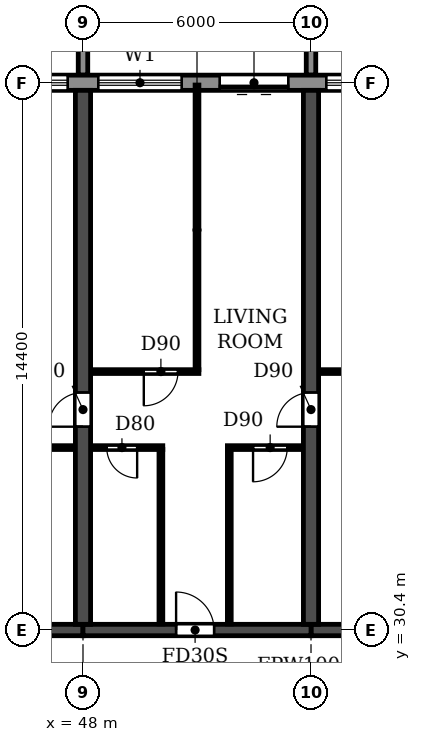
"""IFC4 building model, lengths in metres.
Left out: names, types, materials, properties, quantities, classifications, styles, units other than length and angle.
Written with IfcOpenShell. Run it as: python <this file> out.ifc"""

import sys

from ifc_helpers import new_model, si_unit, direction, frame, frame_2d, origin, place, context, subcontext, project, spatial, polyline, rectangle, outline, extrude, source, transform, mapped, element, fill, save


model = new_model("IFC4")
c1 = context("Model", 3, precision=1e-05, world=origin(), true_north=direction((0.0, 1.0)))
c2 = subcontext(c1, "Body", "Model", "MODEL_VIEW")
j1 = project(units=[si_unit("LENGTHUNIT", "METRE"), si_unit("PLANEANGLEUNIT", "RADIAN")], contexts=[c1])
p1 = place(None, origin())
s1 = spatial("IfcSite", under=j1, at=p1, CompositionType="ELEMENT")
p2 = place(p1, origin())
s2 = spatial("IfcBuilding", under=s1, at=p2, CompositionType="ELEMENT")
p3 = place(p2, frame((0.0, 0.0, 33.3)))
s3 = spatial("IfcBuildingStorey", under=s2, at=p3, CompositionType="ELEMENT", Elevation=33.3)
p4 = place(p3, frame((48.0, 30.55, 0.0), z_axis=(0.0, 0.0, 1.0), x_axis=(0.0, 1.0, 0.0)))
e1 = element("IfcWall", 1, at=p4, inside=s3, PredefinedType="SHEAR", context=c2, shape_type="SweptSolid", body=[
    extrude(rectangle(XDim=14.05, YDim=0.4, at=frame_2d((7.025, 0.0))), origin(), (0.0, 0.0, 1.0), 3.05),
])
p5 = place(p4, frame((5.2, 0.0, 0.0)))
e2 = element("IfcOpeningElement", 2, at=p5, cuts=e1, PredefinedType="OPENING", context=c2, shape_type="SweptSolid", body=[
    extrude(rectangle(XDim=0.9, YDim=2.1, at=frame_2d((0.45, 1.05))), frame((0.0, 0.21, 0.0), z_axis=(0.0, -1.0, 0.0), x_axis=(1.0, 0.0, 0.0)), (0.0, 0.0, 1.0), 0.42),
])
p6 = place(p3, frame((54.0, 30.55, 0.0), z_axis=(0.0, 0.0, 1.0), x_axis=(0.0, 1.0, 0.0)))
e3 = element("IfcWall", 3, at=p6, inside=s3, PredefinedType="SHEAR", context=c2, shape_type="SweptSolid", body=[
    extrude(rectangle(XDim=14.05, YDim=0.4, at=frame_2d((7.025, 0.0))), origin(), (0.0, 0.0, 1.0), 3.05),
])
p7 = place(p6, frame((5.2, 0.0, 0.0)))
e4 = element("IfcOpeningElement", 4, at=p7, cuts=e3, PredefinedType="OPENING", context=c2, shape_type="SweptSolid", body=[
    extrude(rectangle(XDim=0.9, YDim=2.1, at=frame_2d((0.45, 1.05))), frame((0.0, 0.21, 0.0), z_axis=(0.0, -1.0, 0.0), x_axis=(1.0, 0.0, 0.0)), (0.0, 0.0, 1.0), 0.42),
])
p8 = place(p3, frame((42.0, 30.4, 0.0), z_axis=(0.0, 0.0, 1.0), x_axis=(1.0, 0.0, 0.0)))
e5 = element("IfcWall", 5, at=p8, inside=s3, PredefinedType="SHEAR", context=c2, shape_type="SweptSolid", body=[
    extrude(rectangle(XDim=6.0, YDim=0.3, at=frame_2d((3.0, 0.0))), origin(), (0.0, 0.0, 1.0), 2.45),
])
p9 = place(p3, frame((48.0, 30.4, 0.0), z_axis=(0.0, 0.0, 1.0), x_axis=(1.0, 0.0, 0.0)))
e6 = element("IfcWall", 6, at=p9, inside=s3, PredefinedType="SHEAR", context=c2, shape_type="SweptSolid", body=[
    extrude(rectangle(XDim=6.0, YDim=0.3, at=frame_2d((3.0, 0.0))), origin(), (0.0, 0.0, 1.0), 2.45),
])
p10 = place(p9, frame((2.45, 0.0, 0.0)))
e7 = element("IfcOpeningElement", 7, at=p10, cuts=e6, PredefinedType="OPENING", context=c2, shape_type="SweptSolid", body=[
    extrude(rectangle(XDim=1.0, YDim=2.1, at=frame_2d((0.5, 1.05))), frame((0.0, 0.16, 0.0), z_axis=(0.0, -1.0, 0.0), x_axis=(1.0, 0.0, 0.0)), (0.0, 0.0, 1.0), 0.32),
])
p11 = place(p3, frame((54.0, 30.4, 0.0), z_axis=(0.0, 0.0, 1.0), x_axis=(1.0, 0.0, 0.0)))
e8 = element("IfcWall", 8, at=p11, inside=s3, PredefinedType="SHEAR", context=c2, shape_type="SweptSolid", body=[
    extrude(rectangle(XDim=6.0, YDim=0.3, at=frame_2d((3.0, 0.0))), origin(), (0.0, 0.0, 1.0), 2.45),
])
p12 = place(p3, frame((97.317, 44.8, 0.0), z_axis=(0.0, 0.0, 1.0), x_axis=(-1.0, 0.0, 0.0)))
e9 = element("IfcWall", 9, at=p12, inside=s3, PredefinedType="STANDARD", context=c2, shape_type="SweptSolid", body=[
    extrude(rectangle(XDim=92.634, YDim=0.4, at=frame_2d((46.317, 0.0))), origin(), (0.0, 0.0, 1.0), 3.05),
])
p13 = place(p12, frame((88.717, 0.0, 0.9)))
e10 = element("IfcOpeningElement", 10, at=p13, cuts=e9, PredefinedType="OPENING", context=c2, shape_type="SweptSolid", body=[
    extrude(rectangle(XDim=2.2, YDim=1.5, at=frame_2d((1.1, 0.75))), frame((0.0, 0.21, 0.0), z_axis=(0.0, -1.0, 0.0), x_axis=(1.0, 0.0, 0.0)), (0.0, 0.0, 1.0), 0.42),
])
p14 = place(p12, frame((85.917, 0.0, 0.0)))
e11 = element("IfcOpeningElement", 11, at=p14, cuts=e9, PredefinedType="OPENING", context=c2, shape_type="SweptSolid", body=[
    extrude(rectangle(XDim=1.8, YDim=2.4, at=frame_2d((0.9, 1.2))), frame((0.0, 0.21, 0.0), z_axis=(0.0, -1.0, 0.0), x_axis=(1.0, 0.0, 0.0)), (0.0, 0.0, 1.0), 0.42),
])
p15 = place(p12, frame((82.717, 0.0, 0.9)))
e12 = element("IfcOpeningElement", 12, at=p15, cuts=e9, PredefinedType="OPENING", context=c2, shape_type="SweptSolid", body=[
    extrude(rectangle(XDim=2.2, YDim=1.5, at=frame_2d((1.1, 0.75))), frame((0.0, 0.21, 0.0), z_axis=(0.0, -1.0, 0.0), x_axis=(1.0, 0.0, 0.0)), (0.0, 0.0, 1.0), 0.42),
])
p16 = place(p12, frame((79.917, 0.0, 0.0)))
e13 = element("IfcOpeningElement", 13, at=p16, cuts=e9, PredefinedType="OPENING", context=c2, shape_type="SweptSolid", body=[
    extrude(rectangle(XDim=1.8, YDim=2.4, at=frame_2d((0.9, 1.2))), frame((0.0, 0.21, 0.0), z_axis=(0.0, -1.0, 0.0), x_axis=(1.0, 0.0, 0.0)), (0.0, 0.0, 1.0), 0.42),
])
p17 = place(p12, frame((76.717, 0.0, 0.9)))
e14 = element("IfcOpeningElement", 14, at=p17, cuts=e9, PredefinedType="OPENING", context=c2, shape_type="SweptSolid", body=[
    extrude(rectangle(XDim=2.2, YDim=1.5, at=frame_2d((1.1, 0.75))), frame((0.0, 0.21, 0.0), z_axis=(0.0, -1.0, 0.0), x_axis=(1.0, 0.0, 0.0)), (0.0, 0.0, 1.0), 0.42),
])
p18 = place(p12, frame((73.717, 0.0, 0.9)))
e15 = element("IfcOpeningElement", 15, at=p18, cuts=e9, PredefinedType="OPENING", context=c2, shape_type="SweptSolid", body=[
    extrude(rectangle(XDim=2.2, YDim=1.5, at=frame_2d((1.1, 0.75))), frame((0.0, 0.21, 0.0), z_axis=(0.0, -1.0, 0.0), x_axis=(1.0, 0.0, 0.0)), (0.0, 0.0, 1.0), 0.42),
])
p19 = place(p12, frame((70.717, 0.0, 0.9)))
e16 = element("IfcOpeningElement", 16, at=p19, cuts=e9, PredefinedType="OPENING", context=c2, shape_type="SweptSolid", body=[
    extrude(rectangle(XDim=2.2, YDim=1.5, at=frame_2d((1.1, 0.75))), frame((0.0, 0.21, 0.0), z_axis=(0.0, -1.0, 0.0), x_axis=(1.0, 0.0, 0.0)), (0.0, 0.0, 1.0), 0.42),
])
p20 = place(p12, frame((67.917, 0.0, 0.0)))
e17 = element("IfcOpeningElement", 17, at=p20, cuts=e9, PredefinedType="OPENING", context=c2, shape_type="SweptSolid", body=[
    extrude(rectangle(XDim=1.8, YDim=2.4, at=frame_2d((0.9, 1.2))), frame((0.0, 0.21, 0.0), z_axis=(0.0, -1.0, 0.0), x_axis=(1.0, 0.0, 0.0)), (0.0, 0.0, 1.0), 0.42),
])
p21 = place(p12, frame((64.717, 0.0, 0.9)))
e18 = element("IfcOpeningElement", 18, at=p21, cuts=e9, PredefinedType="OPENING", context=c2, shape_type="SweptSolid", body=[
    extrude(rectangle(XDim=2.2, YDim=1.5, at=frame_2d((1.1, 0.75))), frame((0.0, 0.21, 0.0), z_axis=(0.0, -1.0, 0.0), x_axis=(1.0, 0.0, 0.0)), (0.0, 0.0, 1.0), 0.42),
])
p22 = place(p12, frame((61.717, 0.0, 0.9)))
e19 = element("IfcOpeningElement", 19, at=p22, cuts=e9, PredefinedType="OPENING", context=c2, shape_type="SweptSolid", body=[
    extrude(rectangle(XDim=2.2, YDim=1.5, at=frame_2d((1.1, 0.75))), frame((0.0, 0.21, 0.0), z_axis=(0.0, -1.0, 0.0), x_axis=(1.0, 0.0, 0.0)), (0.0, 0.0, 1.0), 0.42),
])
p23 = place(p12, frame((58.717, 0.0, 0.9)))
e20 = element("IfcOpeningElement", 20, at=p23, cuts=e9, PredefinedType="OPENING", context=c2, shape_type="SweptSolid", body=[
    extrude(rectangle(XDim=2.2, YDim=1.5, at=frame_2d((1.1, 0.75))), frame((0.0, 0.21, 0.0), z_axis=(0.0, -1.0, 0.0), x_axis=(1.0, 0.0, 0.0)), (0.0, 0.0, 1.0), 0.42),
])
p24 = place(p12, frame((55.917, 0.0, 0.0)))
e21 = element("IfcOpeningElement", 21, at=p24, cuts=e9, PredefinedType="OPENING", context=c2, shape_type="SweptSolid", body=[
    extrude(rectangle(XDim=1.8, YDim=2.4, at=frame_2d((0.9, 1.2))), frame((0.0, 0.21, 0.0), z_axis=(0.0, -1.0, 0.0), x_axis=(1.0, 0.0, 0.0)), (0.0, 0.0, 1.0), 0.42),
])
p25 = place(p12, frame((52.717, 0.0, 0.9)))
e22 = element("IfcOpeningElement", 22, at=p25, cuts=e9, PredefinedType="OPENING", context=c2, shape_type="SweptSolid", body=[
    extrude(rectangle(XDim=2.2, YDim=1.5, at=frame_2d((1.1, 0.75))), frame((0.0, 0.21, 0.0), z_axis=(0.0, -1.0, 0.0), x_axis=(1.0, 0.0, 0.0)), (0.0, 0.0, 1.0), 0.42),
])
p26 = place(p12, frame((49.717, 0.0, 0.9)))
e23 = element("IfcOpeningElement", 23, at=p26, cuts=e9, PredefinedType="OPENING", context=c2, shape_type="SweptSolid", body=[
    extrude(rectangle(XDim=2.2, YDim=1.5, at=frame_2d((1.1, 0.75))), frame((0.0, 0.21, 0.0), z_axis=(0.0, -1.0, 0.0), x_axis=(1.0, 0.0, 0.0)), (0.0, 0.0, 1.0), 0.42),
])
p27 = place(p12, frame((46.717, 0.0, 0.9)))
e24 = element("IfcOpeningElement", 24, at=p27, cuts=e9, PredefinedType="OPENING", context=c2, shape_type="SweptSolid", body=[
    extrude(rectangle(XDim=2.2, YDim=1.5, at=frame_2d((1.1, 0.75))), frame((0.0, 0.21, 0.0), z_axis=(0.0, -1.0, 0.0), x_axis=(1.0, 0.0, 0.0)), (0.0, 0.0, 1.0), 0.42),
])
p28 = place(p12, frame((43.917, 0.0, 0.0)))
e25 = element("IfcOpeningElement", 25, at=p28, cuts=e9, PredefinedType="OPENING", context=c2, shape_type="SweptSolid", body=[
    extrude(rectangle(XDim=1.8, YDim=2.4, at=frame_2d((0.9, 1.2))), frame((0.0, 0.21, 0.0), z_axis=(0.0, -1.0, 0.0), x_axis=(1.0, 0.0, 0.0)), (0.0, 0.0, 1.0), 0.42),
])
p29 = place(p12, frame((40.717, 0.0, 0.9)))
e26 = element("IfcOpeningElement", 26, at=p29, cuts=e9, PredefinedType="OPENING", context=c2, shape_type="SweptSolid", body=[
    extrude(rectangle(XDim=2.2, YDim=1.5, at=frame_2d((1.1, 0.75))), frame((0.0, 0.21, 0.0), z_axis=(0.0, -1.0, 0.0), x_axis=(1.0, 0.0, 0.0)), (0.0, 0.0, 1.0), 0.42),
])
p30 = place(p12, frame((37.717, 0.0, 0.9)))
e27 = element("IfcOpeningElement", 27, at=p30, cuts=e9, PredefinedType="OPENING", context=c2, shape_type="SweptSolid", body=[
    extrude(rectangle(XDim=2.2, YDim=1.5, at=frame_2d((1.1, 0.75))), frame((0.0, 0.21, 0.0), z_axis=(0.0, -1.0, 0.0), x_axis=(1.0, 0.0, 0.0)), (0.0, 0.0, 1.0), 0.42),
])
p31 = place(p12, frame((34.717, 0.0, 0.9)))
e28 = element("IfcOpeningElement", 28, at=p31, cuts=e9, PredefinedType="OPENING", context=c2, shape_type="SweptSolid", body=[
    extrude(rectangle(XDim=2.2, YDim=1.5, at=frame_2d((1.1, 0.75))), frame((0.0, 0.21, 0.0), z_axis=(0.0, -1.0, 0.0), x_axis=(1.0, 0.0, 0.0)), (0.0, 0.0, 1.0), 0.42),
])
p32 = place(p12, frame((31.917, 0.0, 0.0)))
e29 = element("IfcOpeningElement", 29, at=p32, cuts=e9, PredefinedType="OPENING", context=c2, shape_type="SweptSolid", body=[
    extrude(rectangle(XDim=1.8, YDim=2.4, at=frame_2d((0.9, 1.2))), frame((0.0, 0.21, 0.0), z_axis=(0.0, -1.0, 0.0), x_axis=(1.0, 0.0, 0.0)), (0.0, 0.0, 1.0), 0.42),
])
p33 = place(p12, frame((28.717, 0.0, 0.9)))
e30 = element("IfcOpeningElement", 30, at=p33, cuts=e9, PredefinedType="OPENING", context=c2, shape_type="SweptSolid", body=[
    extrude(rectangle(XDim=2.2, YDim=1.5, at=frame_2d((1.1, 0.75))), frame((0.0, 0.21, 0.0), z_axis=(0.0, -1.0, 0.0), x_axis=(1.0, 0.0, 0.0)), (0.0, 0.0, 1.0), 0.42),
])
p34 = place(p12, frame((25.717, 0.0, 0.9)))
e31 = element("IfcOpeningElement", 31, at=p34, cuts=e9, PredefinedType="OPENING", context=c2, shape_type="SweptSolid", body=[
    extrude(rectangle(XDim=2.2, YDim=1.5, at=frame_2d((1.1, 0.75))), frame((0.0, 0.21, 0.0), z_axis=(0.0, -1.0, 0.0), x_axis=(1.0, 0.0, 0.0)), (0.0, 0.0, 1.0), 0.42),
])
p35 = place(p12, frame((22.917, 0.0, 0.0)))
e32 = element("IfcOpeningElement", 32, at=p35, cuts=e9, PredefinedType="OPENING", context=c2, shape_type="SweptSolid", body=[
    extrude(rectangle(XDim=1.8, YDim=2.4, at=frame_2d((0.9, 1.2))), frame((0.0, 0.21, 0.0), z_axis=(0.0, -1.0, 0.0), x_axis=(1.0, 0.0, 0.0)), (0.0, 0.0, 1.0), 0.42),
])
p36 = place(p12, frame((19.717, 0.0, 0.9)))
e33 = element("IfcOpeningElement", 33, at=p36, cuts=e9, PredefinedType="OPENING", context=c2, shape_type="SweptSolid", body=[
    extrude(rectangle(XDim=2.2, YDim=1.5, at=frame_2d((1.1, 0.75))), frame((0.0, 0.21, 0.0), z_axis=(0.0, -1.0, 0.0), x_axis=(1.0, 0.0, 0.0)), (0.0, 0.0, 1.0), 0.42),
])
p37 = place(p12, frame((16.717, 0.0, 0.9)))
e34 = element("IfcOpeningElement", 34, at=p37, cuts=e9, PredefinedType="OPENING", context=c2, shape_type="SweptSolid", body=[
    extrude(rectangle(XDim=2.2, YDim=1.5, at=frame_2d((1.1, 0.75))), frame((0.0, 0.21, 0.0), z_axis=(0.0, -1.0, 0.0), x_axis=(1.0, 0.0, 0.0)), (0.0, 0.0, 1.0), 0.42),
])
p38 = place(p12, frame((13.917, 0.0, 0.0)))
e35 = element("IfcOpeningElement", 35, at=p38, cuts=e9, PredefinedType="OPENING", context=c2, shape_type="SweptSolid", body=[
    extrude(rectangle(XDim=1.8, YDim=2.4, at=frame_2d((0.9, 1.2))), frame((0.0, 0.21, 0.0), z_axis=(0.0, -1.0, 0.0), x_axis=(1.0, 0.0, 0.0)), (0.0, 0.0, 1.0), 0.42),
])
p39 = place(p12, frame((10.717, 0.0, 0.9)))
e36 = element("IfcOpeningElement", 36, at=p39, cuts=e9, PredefinedType="OPENING", context=c2, shape_type="SweptSolid", body=[
    extrude(rectangle(XDim=2.2, YDim=1.5, at=frame_2d((1.1, 0.75))), frame((0.0, 0.21, 0.0), z_axis=(0.0, -1.0, 0.0), x_axis=(1.0, 0.0, 0.0)), (0.0, 0.0, 1.0), 0.42),
])
p40 = place(p12, frame((7.917, 0.0, 0.0)))
e37 = element("IfcOpeningElement", 37, at=p40, cuts=e9, PredefinedType="OPENING", context=c2, shape_type="SweptSolid", body=[
    extrude(rectangle(XDim=1.8, YDim=2.4, at=frame_2d((0.9, 1.2))), frame((0.0, 0.21, 0.0), z_axis=(0.0, -1.0, 0.0), x_axis=(1.0, 0.0, 0.0)), (0.0, 0.0, 1.0), 0.42),
])
p41 = place(p12, frame((4.717, 0.0, 0.9)))
e38 = element("IfcOpeningElement", 38, at=p41, cuts=e9, PredefinedType="OPENING", context=c2, shape_type="SweptSolid", body=[
    extrude(rectangle(XDim=2.2, YDim=1.5, at=frame_2d((1.1, 0.75))), frame((0.0, 0.21, 0.0), z_axis=(0.0, -1.0, 0.0), x_axis=(1.0, 0.0, 0.0)), (0.0, 0.0, 1.0), 0.42),
])
p42 = place(p12, frame((1.917, 0.0, 0.0)))
e39 = element("IfcOpeningElement", 39, at=p42, cuts=e9, PredefinedType="OPENING", context=c2, shape_type="SweptSolid", body=[
    extrude(rectangle(XDim=1.8, YDim=2.4, at=frame_2d((0.9, 1.2))), frame((0.0, 0.21, 0.0), z_axis=(0.0, -1.0, 0.0), x_axis=(1.0, 0.0, 0.0)), (0.0, 0.0, 1.0), 0.42),
])
m1 = source(origin(), c2, "Body", "SweptSolid", [
    extrude(outline(polyline([(0.0, 0.0), (0.25, 0.0), (0.25, 3.1), (0.0, 3.1), (0.0, 0.0)])), origin(), (0.0, 0.0, 1.0), 3.1),
])
for number, where in (
    (40, (47.875, 45.0, 0.0)),
    (41, (53.875, 45.0, 0.0)),
):
    element("IfcWall", number, at=place(p3, frame(where)), inside=s3, PredefinedType="STANDARD", context=c2, shape_type="MappedRepresentation", body=[
        mapped(m1, transform((0.0, 0.0, 0.0))),
    ])
p43 = place(p3, frame((45.1, 35.2, 0.0), z_axis=(0.0, 0.0, 1.0), x_axis=(1.0, 0.0, 0.0)))
e42 = element("IfcWall", 42, at=p43, inside=s3, PredefinedType="PARTITIONING", context=c2, shape_type="SweptSolid", body=[
    extrude(rectangle(XDim=2.69, YDim=0.1, at=frame_2d((1.345, 0.0))), origin(), (0.0, 0.0, 1.0), 3.05),
])
p44 = place(p43, frame((1.0, 0.0, 0.0)))
e43 = element("IfcOpeningElement", 43, at=p44, cuts=e42, PredefinedType="OPENING", context=c2, shape_type="SweptSolid", body=[
    extrude(rectangle(XDim=0.8, YDim=2.1, at=frame_2d((0.4, 1.05))), frame((0.0, 0.06, 0.0), z_axis=(0.0, -1.0, 0.0), x_axis=(1.0, 0.0, 0.0)), (0.0, 0.0, 1.0), 0.12),
])
p45 = place(p3, frame((48.21, 35.2, 0.0), z_axis=(0.0, 0.0, 1.0), x_axis=(1.0, 0.0, 0.0)))
e44 = element("IfcWall", 44, at=p45, inside=s3, PredefinedType="PARTITIONING", context=c2, shape_type="SweptSolid", body=[
    extrude(rectangle(XDim=1.89, YDim=0.1, at=frame_2d((0.945, 0.0))), origin(), (0.0, 0.0, 1.0), 3.05),
])
p46 = place(p45, frame((0.415, 0.0, 0.0)))
e45 = element("IfcOpeningElement", 45, at=p46, cuts=e44, PredefinedType="OPENING", context=c2, shape_type="SweptSolid", body=[
    extrude(rectangle(XDim=0.8, YDim=2.1, at=frame_2d((0.4, 1.05))), frame((0.0, 0.06, 0.0), z_axis=(0.0, -1.0, 0.0), x_axis=(1.0, 0.0, 0.0)), (0.0, 0.0, 1.0), 0.12),
])
p47 = place(p3, frame((51.8, 35.2, 0.0), z_axis=(0.0, 0.0, 1.0), x_axis=(1.0, 0.0, 0.0)))
e46 = element("IfcWall", 46, at=p47, inside=s3, PredefinedType="PARTITIONING", context=c2, shape_type="SweptSolid", body=[
    extrude(rectangle(XDim=1.99, YDim=0.1, at=frame_2d((0.995, 0.0))), origin(), (0.0, 0.0, 1.0), 3.05),
])
p48 = place(p47, frame((0.675, 0.0, 0.0)))
e47 = element("IfcOpeningElement", 47, at=p48, cuts=e46, PredefinedType="OPENING", context=c2, shape_type="SweptSolid", body=[
    extrude(rectangle(XDim=0.9, YDim=2.1, at=frame_2d((0.45, 1.05))), frame((0.0, 0.06, 0.0), z_axis=(0.0, -1.0, 0.0), x_axis=(1.0, 0.0, 0.0)), (0.0, 0.0, 1.0), 0.12),
])
p49 = place(p3, frame((48.21, 37.2, 0.0), z_axis=(0.0, 0.0, 1.0), x_axis=(1.0, 0.0, 0.0)))
e48 = element("IfcWall", 48, at=p49, inside=s3, PredefinedType="PARTITIONING", context=c2, shape_type="SweptSolid", body=[
    extrude(rectangle(XDim=2.84, YDim=0.1, at=frame_2d((1.42, 0.0))), origin(), (0.0, 0.0, 1.0), 3.05),
])
p50 = place(p49, frame((1.39, 0.0, 0.0)))
e49 = element("IfcOpeningElement", 49, at=p50, cuts=e48, PredefinedType="OPENING", context=c2, shape_type="SweptSolid", body=[
    extrude(rectangle(XDim=0.9, YDim=2.1, at=frame_2d((0.45, 1.05))), frame((0.0, 0.06, 0.0), z_axis=(0.0, -1.0, 0.0), x_axis=(1.0, 0.0, 0.0)), (0.0, 0.0, 1.0), 0.12),
])
p51 = place(p3, frame((54.21, 37.2, 0.0), z_axis=(0.0, 0.0, 1.0), x_axis=(1.0, 0.0, 0.0)))
e50 = element("IfcWall", 50, at=p51, inside=s3, PredefinedType="PARTITIONING", context=c2, shape_type="SweptSolid", body=[
    extrude(rectangle(XDim=2.69, YDim=0.1, at=frame_2d((1.345, 0.0))), origin(), (0.0, 0.0, 1.0), 3.05),
])
p52 = place(p51, frame((1.39, 0.0, 0.0)))
e51 = element("IfcOpeningElement", 51, at=p52, cuts=e50, PredefinedType="OPENING", context=c2, shape_type="SweptSolid", body=[
    extrude(rectangle(XDim=0.9, YDim=2.1, at=frame_2d((0.45, 1.05))), frame((0.0, 0.06, 0.0), z_axis=(0.0, -1.0, 0.0), x_axis=(1.0, 0.0, 0.0)), (0.0, 0.0, 1.0), 0.12),
])
p53 = place(p3, frame((50.05, 30.56, 0.0), z_axis=(0.0, 0.0, 1.0), x_axis=(0.0, 1.0, 0.0)))
e52 = element("IfcWall", 52, at=p53, inside=s3, PredefinedType="PARTITIONING", context=c2, shape_type="SweptSolid", body=[
    extrude(rectangle(XDim=4.59, YDim=0.1, at=frame_2d((2.295, 0.0))), origin(), (0.0, 0.0, 1.0), 3.05),
])
p54 = place(p3, frame((51.0, 37.25, 0.0), z_axis=(0.0, 0.0, 1.0), x_axis=(0.0, 1.0, 0.0)))
e53 = element("IfcWall", 53, at=p54, inside=s3, PredefinedType="PARTITIONING", context=c2, shape_type="SweptSolid", body=[
    extrude(rectangle(XDim=7.49, YDim=0.1, at=frame_2d((3.745, 0.0))), origin(), (0.0, 0.0, 1.0), 3.05),
])
p55 = place(p3, frame((51.85, 30.56, 0.0), z_axis=(0.0, 0.0, 1.0), x_axis=(0.0, 1.0, 0.0)))
e54 = element("IfcWall", 54, at=p55, inside=s3, PredefinedType="PARTITIONING", context=c2, shape_type="SweptSolid", body=[
    extrude(rectangle(XDim=4.59, YDim=0.1, at=frame_2d((2.295, 0.0))), origin(), (0.0, 0.0, 1.0), 3.05),
])
p56 = place(p26, origin())
e55 = element("IfcWindow", 55, at=p56, inside=s3, PartitioningType="DOUBLE_PANEL_HORIZONTAL", PredefinedType="WINDOW", context=c2, shape_type="SweptSolid", body=[
    extrude(rectangle(XDim=2.2, YDim=1.5, at=frame_2d((1.1, 0.75))), frame((0.0, 0.03, 0.0), z_axis=(0.0, -1.0, 0.0), x_axis=(1.0, 0.0, 0.0)), (0.0, 0.0, 1.0), 0.06),
])
fill(e23, e55)
p57 = place(p27, origin())
e56 = element("IfcWindow", 56, at=p57, inside=s3, PartitioningType="DOUBLE_PANEL_HORIZONTAL", PredefinedType="WINDOW", context=c2, shape_type="SweptSolid", body=[
    extrude(rectangle(XDim=2.2, YDim=1.5, at=frame_2d((1.1, 0.75))), frame((0.0, 0.03, 0.0), z_axis=(0.0, -1.0, 0.0), x_axis=(1.0, 0.0, 0.0)), (0.0, 0.0, 1.0), 0.06),
])
fill(e24, e56)
p58 = place(p28, origin())
e57 = element("IfcDoor", 57, at=p58, inside=s3, OperationType="DOUBLE_DOOR_SLIDING", PredefinedType="DOOR", context=c2, shape_type="SweptSolid", body=[
    extrude(rectangle(XDim=1.8, YDim=2.4, at=frame_2d((0.9, 1.2))), frame((0.0, 0.025, 0.0), z_axis=(0.0, -1.0, 0.0), x_axis=(1.0, 0.0, 0.0)), (0.0, 0.0, 1.0), 0.05),
])
fill(e25, e57)
p59 = place(p29, origin())
e58 = element("IfcWindow", 58, at=p59, inside=s3, PartitioningType="DOUBLE_PANEL_HORIZONTAL", PredefinedType="WINDOW", context=c2, shape_type="SweptSolid", body=[
    extrude(rectangle(XDim=2.2, YDim=1.5, at=frame_2d((1.1, 0.75))), frame((0.0, 0.03, 0.0), z_axis=(0.0, -1.0, 0.0), x_axis=(1.0, 0.0, 0.0)), (0.0, 0.0, 1.0), 0.06),
])
fill(e26, e58)
p60 = place(p5, origin())
e59 = element("IfcDoor", 59, at=p60, inside=s3, OperationType="SINGLE_SWING_LEFT", PredefinedType="DOOR", context=c2, shape_type="SweptSolid", body=[
    extrude(rectangle(XDim=0.9, YDim=2.1, at=frame_2d((0.45, 1.05))), frame((0.0, 0.025, 0.0), z_axis=(0.0, -1.0, 0.0), x_axis=(1.0, 0.0, 0.0)), (0.0, 0.0, 1.0), 0.05),
])
fill(e2, e59)
p61 = place(p46, frame((0.8, 0.0, 0.0), z_axis=(0.0, 0.0, 1.0), x_axis=(-1.0, 0.0, 0.0)))
e60 = element("IfcDoor", 60, at=p61, inside=s3, OperationType="SINGLE_SWING_LEFT", PredefinedType="DOOR", context=c2, shape_type="SweptSolid", body=[
    extrude(rectangle(XDim=0.8, YDim=2.1, at=frame_2d((0.4, 1.05))), frame((0.0, 0.025, 0.0), z_axis=(0.0, -1.0, 0.0), x_axis=(1.0, 0.0, 0.0)), (0.0, 0.0, 1.0), 0.05),
])
fill(e45, e60)
p62 = place(p50, frame((0.9, 0.0, 0.0), z_axis=(0.0, 0.0, 1.0), x_axis=(-1.0, 0.0, 0.0)))
e61 = element("IfcDoor", 61, at=p62, inside=s3, OperationType="SINGLE_SWING_RIGHT", PredefinedType="DOOR", context=c2, shape_type="SweptSolid", body=[
    extrude(rectangle(XDim=0.9, YDim=2.1, at=frame_2d((0.45, 1.05))), frame((0.0, 0.025, 0.0), z_axis=(0.0, -1.0, 0.0), x_axis=(1.0, 0.0, 0.0)), (0.0, 0.0, 1.0), 0.05),
])
fill(e49, e61)
p63 = place(p10, origin())
e62 = element("IfcDoor", 62, at=p63, inside=s3, OperationType="SINGLE_SWING_LEFT", PredefinedType="DOOR", context=c2, shape_type="SweptSolid", body=[
    extrude(rectangle(XDim=1.0, YDim=2.1, at=frame_2d((0.5, 1.05))), frame((0.0, 0.025, 0.0), z_axis=(0.0, -1.0, 0.0), x_axis=(1.0, 0.0, 0.0)), (0.0, 0.0, 1.0), 0.05),
])
fill(e7, e62)
p64 = place(p48, frame((0.9, 0.0, 0.0), z_axis=(0.0, 0.0, 1.0), x_axis=(-1.0, 0.0, 0.0)))
e63 = element("IfcDoor", 63, at=p64, inside=s3, OperationType="SINGLE_SWING_RIGHT", PredefinedType="DOOR", context=c2, shape_type="SweptSolid", body=[
    extrude(rectangle(XDim=0.9, YDim=2.1, at=frame_2d((0.45, 1.05))), frame((0.0, 0.025, 0.0), z_axis=(0.0, -1.0, 0.0), x_axis=(1.0, 0.0, 0.0)), (0.0, 0.0, 1.0), 0.05),
])
fill(e47, e63)
p65 = place(p7, origin())
e64 = element("IfcDoor", 64, at=p65, inside=s3, OperationType="SINGLE_SWING_LEFT", PredefinedType="DOOR", context=c2, shape_type="SweptSolid", body=[
    extrude(rectangle(XDim=0.9, YDim=2.1, at=frame_2d((0.45, 1.05))), frame((0.0, 0.025, 0.0), z_axis=(0.0, -1.0, 0.0), x_axis=(1.0, 0.0, 0.0)), (0.0, 0.0, 1.0), 0.05),
])
fill(e4, e64)
save(model, sys.argv[1])
